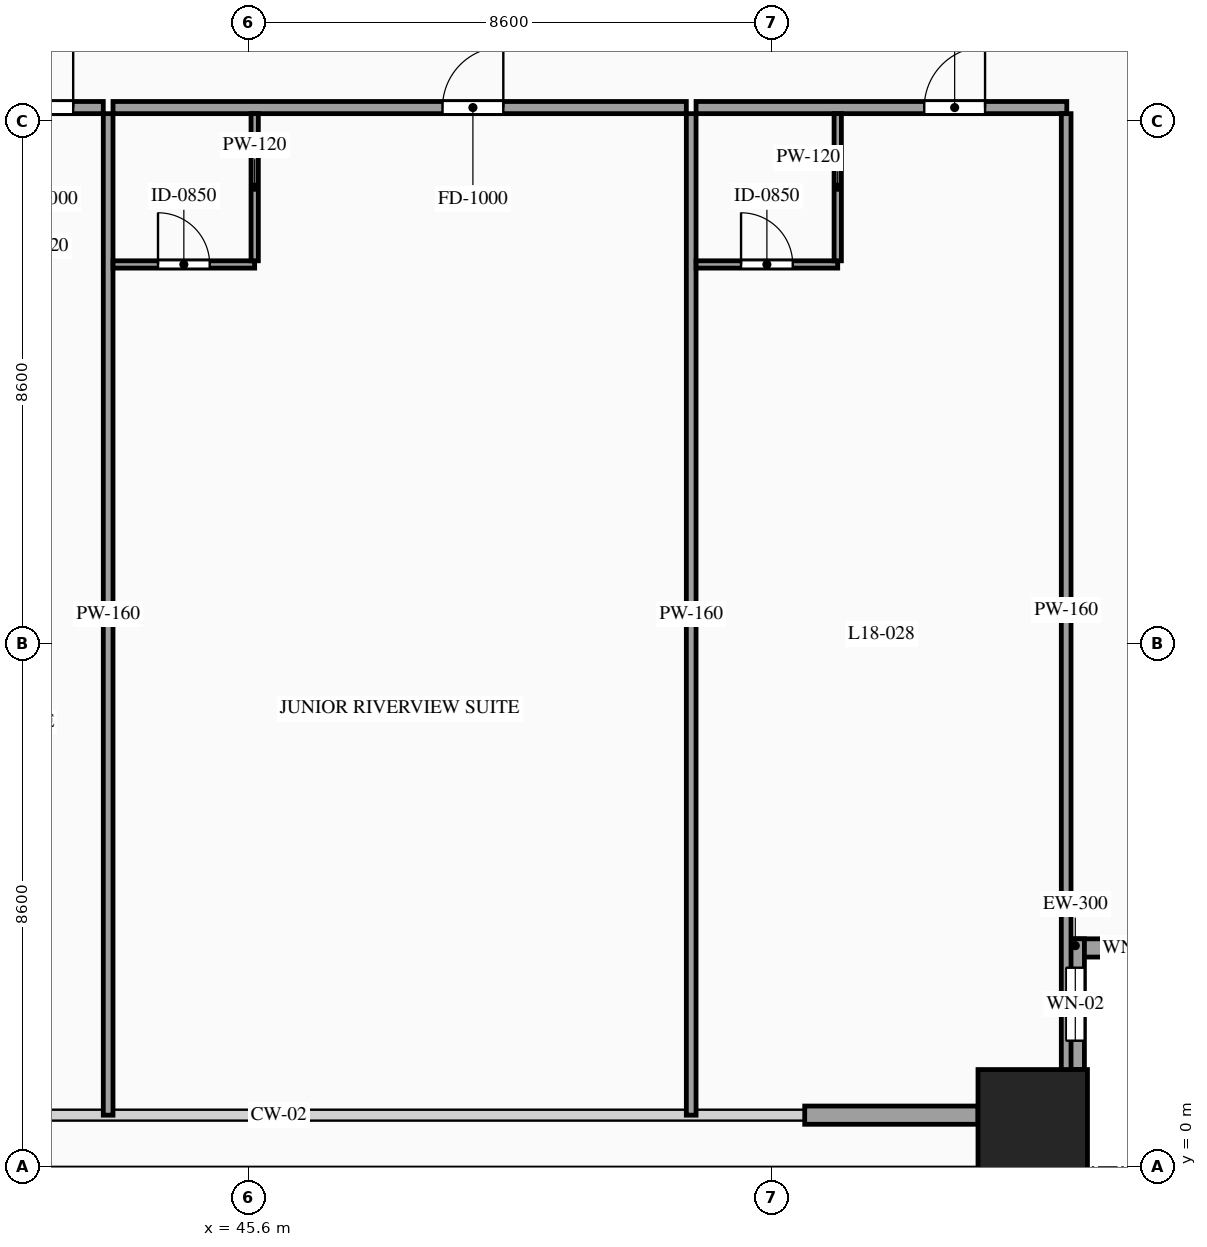
"""IFC4 building model, lengths in metres.
Left out: names, types, materials, properties, quantities, classifications, styles, units other than length and angle.
Written with IfcOpenShell. Run it as: python <this file> out.ifc"""

import sys

from ifc_helpers import new_model, si_unit, direction, frame, frame_2d, origin, origin_2d, place, context, subcontext, project, spatial, rectangle, hollow_rectangle, extrude, source, transform, mapped, element, fill, save


model = new_model("IFC4")
c1 = context("Model", 3, precision=1e-05, world=origin(), true_north=direction((0.0, 1.0)))
c2 = subcontext(c1, "Body", "Model", "MODEL_VIEW")
j1 = project(units=[si_unit("LENGTHUNIT", "METRE"), si_unit("PLANEANGLEUNIT", "RADIAN")], contexts=[c1])
p1 = place(None, origin())
s1 = spatial("IfcSite", under=j1, at=p1, CompositionType="ELEMENT")
p2 = place(p1, origin())
s2 = spatial("IfcBuilding", under=s1, at=p2, CompositionType="ELEMENT")
p3 = place(p2, frame((0.0, 0.0, 71.2)))
s3 = spatial("IfcBuildingStorey", under=s2, at=p3, CompositionType="ELEMENT", Elevation=71.2)
m1 = source(origin(), c2, "Body", "SweptSolid", [
    extrude(hollow_rectangle(XDim=1.8, YDim=1.8, WallThickness=0.08, at=origin_2d()), origin(), (0.0, 0.0, 1.0), 3.6),
])
p4 = place(p3, frame((58.5, 0.7, 0.0), z_axis=(0.0, 0.0, 1.0), x_axis=(1.0, 0.0, 0.0)))
e1 = element("IfcColumn", 1, at=p4, inside=s3, PredefinedType="COLUMN", context=c2, shape_type="MappedRepresentation", body=[
    mapped(m1, transform((0.0, 0.0, 0.0), scale=1.0)),
])
p5 = place(p3, frame((59.05, 3.6, 0.0), z_axis=(0.0, 0.0, 1.0), x_axis=(1.0, 0.0, 0.0)))
e2 = element("IfcWall", 2, at=p5, inside=s3, PredefinedType="SOLIDWALL", context=c2, shape_type="SweptSolid", body=[
    extrude(rectangle(XDim=2.15, YDim=0.3, at=frame_2d((1.075, 0.0))), origin(), (0.0, 0.0, 1.0), 3.38),
])
p6 = place(p5, frame((0.625, 0.0, 0.85)))
e3 = element("IfcOpeningElement", 3, at=p6, cuts=e2, PredefinedType="OPENING", context=c2, shape_type="SweptSolid", body=[
    extrude(rectangle(XDim=0.9, YDim=1.5, at=frame_2d((0.45, 0.75))), frame((0.0, 0.165, 0.0), z_axis=(0.0, -1.0, 0.0), x_axis=(1.0, 0.0, 0.0)), (0.0, 0.0, 1.0), 0.33),
])
p7 = place(p3, frame((59.2, 1.6, 0.0), z_axis=(0.0, 0.0, 1.0), x_axis=(0.0, 1.0, 0.0)))
e4 = element("IfcWall", 4, at=p7, inside=s3, PredefinedType="SOLIDWALL", context=c2, shape_type="SweptSolid", body=[
    extrude(rectangle(XDim=2.15, YDim=0.3, at=frame_2d((1.075, 0.0))), origin(), (0.0, 0.0, 1.0), 3.38),
])
p8 = place(p7, frame((0.475, 0.0, 0.85)))
e5 = element("IfcOpeningElement", 5, at=p8, cuts=e4, PredefinedType="OPENING", context=c2, shape_type="SweptSolid", body=[
    extrude(rectangle(XDim=1.2, YDim=2.1, at=frame_2d((0.6, 1.05))), frame((0.0, 0.165, 0.0), z_axis=(0.0, -1.0, 0.0), x_axis=(1.0, 0.0, 0.0)), (0.0, 0.0, 1.0), 0.33),
])
m2 = source(origin(), c2, "Body", "SweptSolid", [
    extrude(rectangle(XDim=2.85, YDim=0.3, at=frame_2d((1.425, 0.0))), origin(), (0.0, 0.0, 1.0), 2.775),
])
p9 = place(p3, frame((54.75, 0.85, 0.0), z_axis=(0.0, 0.0, 1.0), x_axis=(1.0, 0.0, 0.0)))
e6 = element("IfcWall", 6, at=p9, inside=s3, PredefinedType="SOLIDWALL", context=c2, shape_type="MappedRepresentation", body=[
    mapped(m2, transform((0.0, 0.0, 0.0), scale=1.0)),
])
p10 = place(p3, frame((38.845, 17.42, 0.0), z_axis=(0.0, 0.0, 1.0), x_axis=(1.0, 0.0, 0.0)))
e7 = element("IfcWall", 7, at=p10, inside=s3, PredefinedType="PARTITIONING", context=c2, shape_type="SweptSolid", body=[
    extrude(rectangle(XDim=4.369, YDim=0.2, at=frame_2d((2.185, 0.0))), origin(), (0.0, 0.0, 1.0), 3.38),
])
p11 = place(p10, frame((2.874, 0.0, 0.0)))
e8 = element("IfcOpeningElement", 8, at=p11, cuts=e7, PredefinedType="OPENING", context=c2, shape_type="SweptSolid", body=[
    extrude(rectangle(XDim=1.0, YDim=2.2, at=frame_2d((0.5, 1.1))), frame((0.0, 0.115, 0.0), z_axis=(0.0, -1.0, 0.0), x_axis=(1.0, 0.0, 0.0)), (0.0, 0.0, 1.0), 0.23),
])
m3 = source(origin(), c2, "Body", "SweptSolid", [
    extrude(rectangle(XDim=16.47, YDim=0.16, at=frame_2d((8.235, 0.0))), origin(), (0.0, 0.0, 1.0), 3.38),
])
p12 = place(p3, frame((43.294, 0.85, 0.0), z_axis=(0.0, 0.0, 1.0), x_axis=(0.0, 1.0, 0.0)))
e9 = element("IfcWall", 9, at=p12, inside=s3, PredefinedType="PARTITIONING", context=c2, shape_type="MappedRepresentation", body=[
    mapped(m3, transform((0.0, 0.0, 0.0), scale=1.0)),
])
p13 = place(p3, frame((43.374, 17.42, 0.0), z_axis=(0.0, 0.0, 1.0), x_axis=(1.0, 0.0, 0.0)))
e10 = element("IfcWall", 10, at=p13, inside=s3, PredefinedType="PARTITIONING", context=c2, shape_type="SweptSolid", body=[
    extrude(rectangle(XDim=9.429, YDim=0.2, at=frame_2d((4.714, 0.0))), origin(), (0.0, 0.0, 1.0), 3.38),
])
p14 = place(p13, frame((5.419, 0.0, 0.0)))
e11 = element("IfcOpeningElement", 11, at=p14, cuts=e10, PredefinedType="OPENING", context=c2, shape_type="SweptSolid", body=[
    extrude(rectangle(XDim=1.0, YDim=2.2, at=frame_2d((0.5, 1.1))), frame((0.0, 0.115, 0.0), z_axis=(0.0, -1.0, 0.0), x_axis=(1.0, 0.0, 0.0)), (0.0, 0.0, 1.0), 0.23),
])
p15 = place(p3, frame((52.883, 0.85, 0.0), z_axis=(0.0, 0.0, 1.0), x_axis=(0.0, 1.0, 0.0)))
e12 = element("IfcWall", 12, at=p15, inside=s3, PredefinedType="PARTITIONING", context=c2, shape_type="MappedRepresentation", body=[
    mapped(m3, transform((0.0, 0.0, 0.0), scale=1.0)),
])
p16 = place(p3, frame((43.374, 14.84, 0.0), z_axis=(0.0, 0.0, 1.0), x_axis=(1.0, 0.0, 0.0)))
e13 = element("IfcWall", 13, at=p16, inside=s3, PredefinedType="PARTITIONING", context=c2, shape_type="SweptSolid", body=[
    extrude(rectangle(XDim=2.33, YDim=0.12, at=frame_2d((1.165, 0.0))), origin(), (0.0, 0.0, 1.0), 3.38),
])
p17 = place(p16, frame((0.74, 0.0, 0.0)))
e14 = element("IfcOpeningElement", 14, at=p17, cuts=e13, PredefinedType="OPENING", context=c2, shape_type="SweptSolid", body=[
    extrude(rectangle(XDim=0.85, YDim=2.1, at=frame_2d((0.425, 1.05))), frame((0.0, 0.075, 0.0), z_axis=(0.0, -1.0, 0.0), x_axis=(1.0, 0.0, 0.0)), (0.0, 0.0, 1.0), 0.15),
])
m4 = source(origin(), c2, "Body", "SweptSolid", [
    extrude(rectangle(XDim=2.42, YDim=0.12, at=frame_2d((1.21, 0.0))), origin(), (0.0, 0.0, 1.0), 3.38),
])
p18 = place(p3, frame((45.704, 14.9, 0.0), z_axis=(0.0, 0.0, 1.0), x_axis=(0.0, 1.0, 0.0)))
e15 = element("IfcWall", 15, at=p18, inside=s3, PredefinedType="PARTITIONING", context=c2, shape_type="MappedRepresentation", body=[
    mapped(m4, transform((0.0, 0.0, 0.0), scale=1.0)),
])
p19 = place(p3, frame((52.963, 17.42, 0.0), z_axis=(0.0, 0.0, 1.0), x_axis=(1.0, 0.0, 0.0)))
e16 = element("IfcWall", 16, at=p19, inside=s3, PredefinedType="PARTITIONING", context=c2, shape_type="SweptSolid", body=[
    extrude(rectangle(XDim=6.097, YDim=0.2, at=frame_2d((3.049, 0.0))), origin(), (0.0, 0.0, 1.0), 3.38),
])
p20 = place(p19, frame((3.753, 0.0, 0.0)))
e17 = element("IfcOpeningElement", 17, at=p20, cuts=e16, PredefinedType="OPENING", context=c2, shape_type="SweptSolid", body=[
    extrude(rectangle(XDim=1.0, YDim=2.2, at=frame_2d((0.5, 1.1))), frame((0.0, 0.115, 0.0), z_axis=(0.0, -1.0, 0.0), x_axis=(1.0, 0.0, 0.0)), (0.0, 0.0, 1.0), 0.23),
])
m5 = source(origin(), c2, "Body", "SweptSolid", [
    extrude(rectangle(XDim=16.32, YDim=0.16, at=frame_2d((8.16, 0.0))), origin(), (0.0, 0.0, 1.0), 3.38),
])
p21 = place(p3, frame((59.05, 1.0, 0.0), z_axis=(0.0, 0.0, 1.0), x_axis=(0.0, 1.0, 0.0)))
e18 = element("IfcWall", 18, at=p21, inside=s3, PredefinedType="PARTITIONING", context=c2, shape_type="MappedRepresentation", body=[
    mapped(m5, transform((0.0, 0.0, 0.0), scale=1.0)),
])
p22 = place(p3, frame((52.963, 14.84, 0.0), z_axis=(0.0, 0.0, 1.0), x_axis=(1.0, 0.0, 0.0)))
e19 = element("IfcWall", 19, at=p22, inside=s3, PredefinedType="PARTITIONING", context=c2, shape_type="SweptSolid", body=[
    extrude(rectangle(XDim=2.33, YDim=0.12, at=frame_2d((1.165, 0.0))), origin(), (0.0, 0.0, 1.0), 3.38),
])
p23 = place(p22, frame((0.74, 0.0, 0.0)))
e20 = element("IfcOpeningElement", 20, at=p23, cuts=e19, PredefinedType="OPENING", context=c2, shape_type="SweptSolid", body=[
    extrude(rectangle(XDim=0.85, YDim=2.1, at=frame_2d((0.425, 1.05))), frame((0.0, 0.075, 0.0), z_axis=(0.0, -1.0, 0.0), x_axis=(1.0, 0.0, 0.0)), (0.0, 0.0, 1.0), 0.15),
])
p24 = place(p3, frame((55.293, 14.9, 0.0), z_axis=(0.0, 0.0, 1.0), x_axis=(0.0, 1.0, 0.0)))
e21 = element("IfcWall", 21, at=p24, inside=s3, PredefinedType="PARTITIONING", context=c2, shape_type="MappedRepresentation", body=[
    mapped(m4, transform((0.0, 0.0, 0.0), scale=1.0)),
])
m6 = source(origin(), c2, "Body", "SweptSolid", [
    extrude(rectangle(XDim=0.9, YDim=1.5, at=frame_2d((0.45, 0.75))), frame((0.0, 0.03, 0.0), z_axis=(0.0, -1.0, 0.0), x_axis=(1.0, 0.0, 0.0)), (0.0, 0.0, 1.0), 0.06),
])
p25 = place(p6, origin())
e22 = element("IfcWindow", 22, at=p25, inside=s3, PartitioningType="SINGLE_PANEL", PredefinedType="WINDOW", context=c2, shape_type="MappedRepresentation", body=[
    mapped(m6, transform((0.0, 0.0, 0.0), scale=1.0)),
])
fill(e3, e22)
m7 = source(origin(), c2, "Body", "SweptSolid", [
    extrude(rectangle(XDim=1.2, YDim=2.1, at=frame_2d((0.6, 1.05))), frame((0.0, 0.03, 0.0), z_axis=(0.0, -1.0, 0.0), x_axis=(1.0, 0.0, 0.0)), (0.0, 0.0, 1.0), 0.06),
])
p26 = place(p8, origin())
e23 = element("IfcWindow", 23, at=p26, inside=s3, PartitioningType="SINGLE_PANEL", PredefinedType="WINDOW", context=c2, shape_type="MappedRepresentation", body=[
    mapped(m7, transform((0.0, 0.0, 0.0), scale=1.0)),
])
fill(e5, e23)
m8 = source(origin(), c2, "Body", "SweptSolid", [
    extrude(rectangle(XDim=1.0, YDim=2.2, at=frame_2d((0.5, 1.1))), frame((0.0, 0.025, 0.0), z_axis=(0.0, -1.0, 0.0), x_axis=(1.0, 0.0, 0.0)), (0.0, 0.0, 1.0), 0.05),
])
p27 = place(p11, origin())
e24 = element("IfcDoor", 24, at=p27, inside=s3, OperationType="SINGLE_SWING_RIGHT", PredefinedType="DOOR", context=c2, shape_type="MappedRepresentation", body=[
    mapped(m8, transform((0.0, 0.0, 0.0), scale=1.0)),
])
fill(e8, e24)
p28 = place(p14, origin())
e25 = element("IfcDoor", 25, at=p28, inside=s3, OperationType="SINGLE_SWING_RIGHT", PredefinedType="DOOR", context=c2, shape_type="MappedRepresentation", body=[
    mapped(m8, transform((0.0, 0.0, 0.0), scale=1.0)),
])
fill(e11, e25)
m9 = source(origin(), c2, "Body", "SweptSolid", [
    extrude(rectangle(XDim=0.85, YDim=2.1, at=frame_2d((0.425, 1.05))), frame((0.0, 0.025, 0.0), z_axis=(0.0, -1.0, 0.0), x_axis=(1.0, 0.0, 0.0)), (0.0, 0.0, 1.0), 0.05),
])
p29 = place(p17, origin())
e26 = element("IfcDoor", 26, at=p29, inside=s3, OperationType="SINGLE_SWING_LEFT", PredefinedType="DOOR", context=c2, shape_type="MappedRepresentation", body=[
    mapped(m9, transform((0.0, 0.0, 0.0), scale=1.0)),
])
fill(e14, e26)
p30 = place(p20, origin())
e27 = element("IfcDoor", 27, at=p30, inside=s3, OperationType="SINGLE_SWING_RIGHT", PredefinedType="DOOR", context=c2, shape_type="MappedRepresentation", body=[
    mapped(m8, transform((0.0, 0.0, 0.0), scale=1.0)),
])
fill(e17, e27)
p31 = place(p23, origin())
e28 = element("IfcDoor", 28, at=p31, inside=s3, OperationType="SINGLE_SWING_LEFT", PredefinedType="DOOR", context=c2, shape_type="MappedRepresentation", body=[
    mapped(m9, transform((0.0, 0.0, 0.0), scale=1.0)),
])
fill(e20, e28)
save(model, sys.argv[1])
